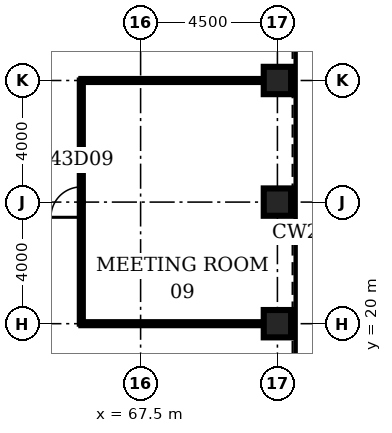
"""IFC4 building model, lengths in metres.
Left out: names, types, materials, properties, quantities, classifications, styles, units other than length and angle.
Written with IfcOpenShell. Run it as: python <this file> out.ifc"""

import sys

from ifc_helpers import new_model, si_unit, direction, frame, frame_2d, origin, origin_2d, place, context, subcontext, project, spatial, rectangle, hollow_rectangle, extrude, element, fill, save


model = new_model("IFC4")
c1 = context("Model", 3, precision=1e-05, world=origin(), true_north=direction((0.0, 1.0)))
c2 = subcontext(c1, "Body", "Model", "MODEL_VIEW")
j1 = project(units=[si_unit("LENGTHUNIT", "METRE"), si_unit("PLANEANGLEUNIT", "RADIAN")], contexts=[c1])
p1 = place(None, origin())
s1 = spatial("IfcSite", under=j1, at=p1, CompositionType="ELEMENT")
p2 = place(p1, origin())
s2 = spatial("IfcBuilding", under=s1, at=p2, CompositionType="ELEMENT")
p3 = place(p2, frame((0.0, 0.0, 194.2)))
s3 = spatial("IfcBuildingStorey", under=s2, at=p3, CompositionType="ELEMENT", Elevation=194.2)
for number, where, z_axis, x_axis in (
    (1, (72.0, 20.0, 0.0), (0.0, 0.0, 1.0), (1.0, 0.0, 0.0)),
    (2, (72.0, 24.0, 0.0), (0.0, 0.0, 1.0), (1.0, 0.0, 0.0)),
    (3, (72.0, 28.0, 0.0), (0.0, 0.0, 1.0), (1.0, 0.0, 0.0)),
):
    element("IfcColumn", number, at=place(p3, frame(where, z_axis=z_axis, x_axis=x_axis)), inside=s3, PredefinedType="COLUMN", context=c2, shape_type="SweptSolid", body=[
        extrude(hollow_rectangle(XDim=0.9, YDim=0.9, WallThickness=0.09, at=origin_2d()), origin(), (0.0, 0.0, 1.0), 4.2),
    ])
for number, where, z_axis, x_axis in (
    (4, (65.55, 20.0, 0.0), (0.0, 0.0, 1.0), (1.0, 0.0, 0.0)),
    (5, (65.55, 28.0, 0.0), (0.0, 0.0, 1.0), (1.0, 0.0, 0.0)),
):
    element("IfcWall", number, at=place(p3, frame(where, z_axis=z_axis, x_axis=x_axis)), inside=s3, PredefinedType="PARTITIONING", context=c2, shape_type="SweptSolid", body=[
        extrude(rectangle(XDim=6.0, YDim=0.1, at=frame_2d((3.0, 0.0))), origin(), (0.0, 0.0, 1.0), 3.0),
    ])
p4 = place(p3, frame((65.55, 20.0, 0.0), z_axis=(0.0, 0.0, 1.0), x_axis=(0.0, 1.0, 0.0)))
e6 = element("IfcWall", 6, at=p4, inside=s3, PredefinedType="PARTITIONING", context=c2, shape_type="SweptSolid", body=[
    extrude(rectangle(XDim=8.0, YDim=0.1, at=frame_2d((4.0, 0.0))), origin(), (0.0, 0.0, 1.0), 3.0),
])
p5 = place(p4, frame((3.5, 0.0, 0.0)))
e7 = element("IfcOpeningElement", 7, at=p5, cuts=e6, PredefinedType="OPENING", context=c2, shape_type="SweptSolid", body=[
    extrude(rectangle(XDim=1.0, YDim=2.1, at=frame_2d((0.5, 1.05))), frame((0.0, 0.06, 0.0), z_axis=(0.0, -1.0, 0.0), x_axis=(1.0, 0.0, 0.0)), (0.0, 0.0, 1.0), 0.12),
])
p6 = place(p5, origin())
e8 = element("IfcDoor", 8, at=p6, inside=s3, OperationType="SINGLE_SWING_LEFT", PredefinedType="DOOR", context=c2, shape_type="SweptSolid", body=[
    extrude(rectangle(XDim=1.0, YDim=2.1, at=frame_2d((0.5, 1.05))), frame((0.0, 0.025, 0.0), z_axis=(0.0, -1.0, 0.0), x_axis=(1.0, 0.0, 0.0)), (0.0, 0.0, 1.0), 0.05),
])
fill(e7, e8)
save(model, sys.argv[1])
